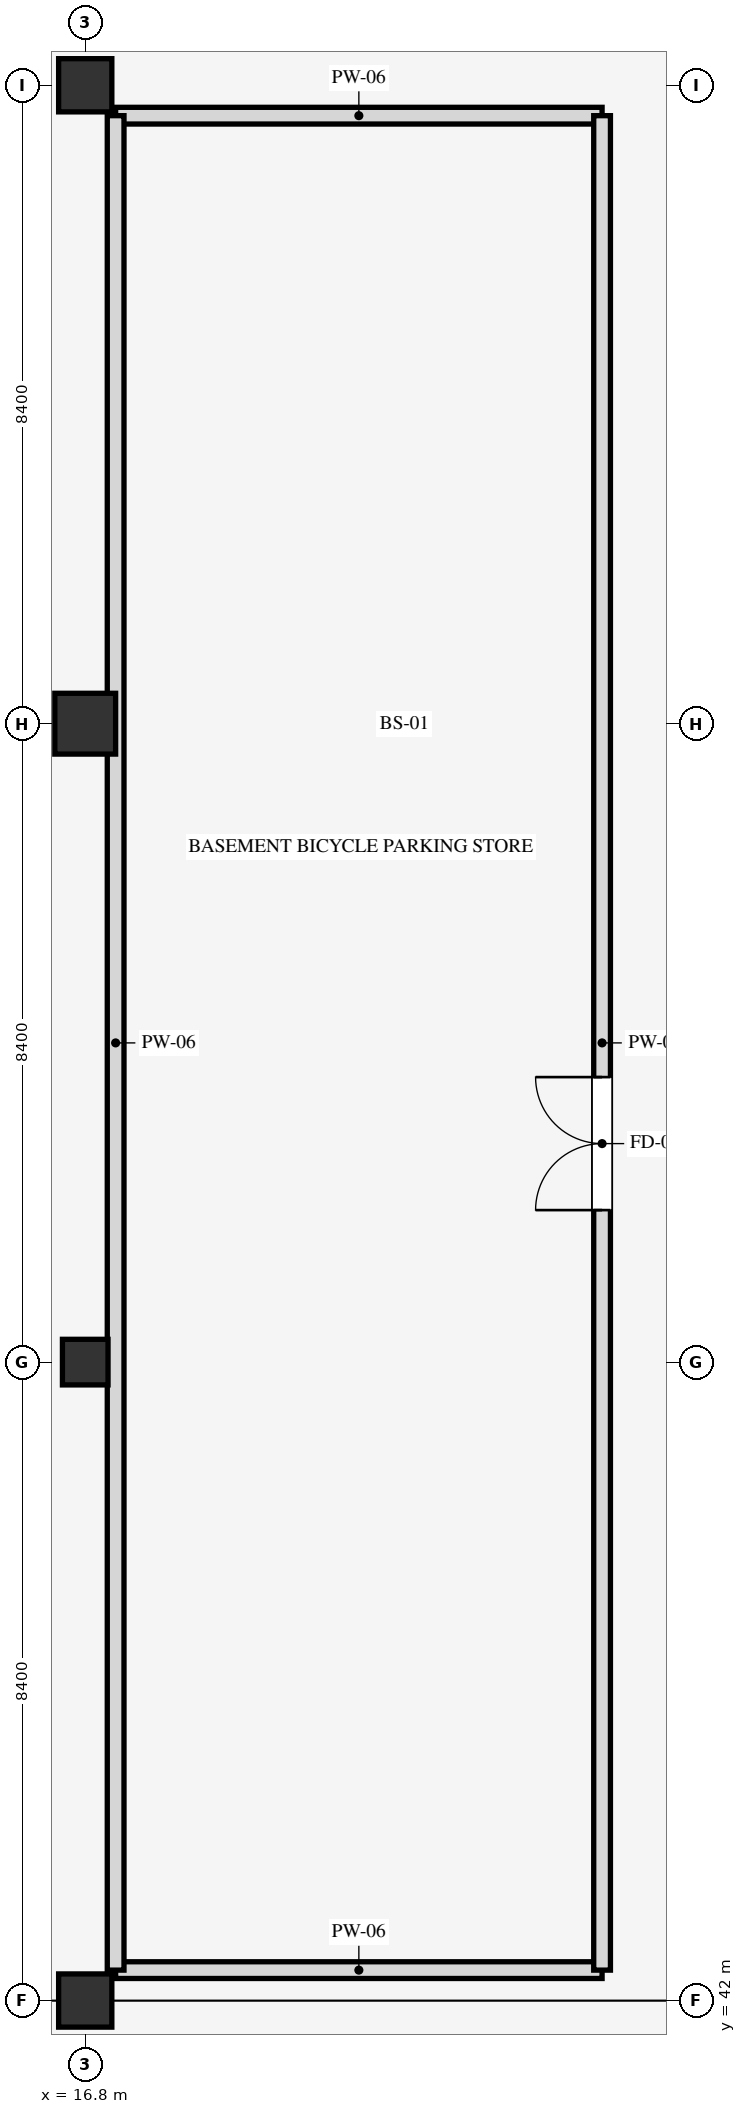
"""IFC4 building model, lengths in metres.
Left out: names, types, materials, properties, quantities, classifications, styles, units other than length and angle.
Written with IfcOpenShell. Run it as: python <this file> out.ifc"""

import sys

from ifc_helpers import new_model, si_unit, direction, frame, frame_2d, origin, origin_2d, place, context, subcontext, project, spatial, rectangle, extrude, element, fill, save


model = new_model("IFC4")
c1 = context("Model", 3, precision=1e-05, world=origin(), true_north=direction((0.0, 1.0)))
c2 = subcontext(c1, "Body", "Model", "MODEL_VIEW")
j1 = project(units=[si_unit("LENGTHUNIT", "METRE"), si_unit("PLANEANGLEUNIT", "RADIAN")], contexts=[c1])
p1 = place(None, origin())
s1 = spatial("IfcSite", under=j1, at=p1, CompositionType="ELEMENT")
p2 = place(p1, origin())
s2 = spatial("IfcBuilding", under=s1, at=p2, CompositionType="ELEMENT")
p3 = place(p2, frame((0.0, 0.0, -5.4)))
s3 = spatial("IfcBuildingStorey", under=s2, at=p3, CompositionType="ELEMENT", Elevation=-5.4)
p4 = place(p3, frame((16.8, 42.0, 0.0), z_axis=(0.0, 0.0, 1.0), x_axis=(1.0, 0.0, 0.0)))
e1 = element("IfcColumn", 1, at=p4, inside=s3, PredefinedType="COLUMN", context=c2, shape_type="SweptSolid", body=[
    extrude(rectangle(XDim=0.7, YDim=0.7, at=origin_2d()), origin(), (0.0, 0.0, 1.0), 5.4),
])
p5 = place(p3, frame((16.8, 50.4, 0.0), z_axis=(0.0, 0.0, 1.0), x_axis=(1.0, 0.0, 0.0)))
e2 = element("IfcColumn", 2, at=p5, inside=s3, PredefinedType="COLUMN", context=c2, shape_type="SweptSolid", body=[
    extrude(rectangle(XDim=0.6, YDim=0.6, at=origin_2d()), origin(), (0.0, 0.0, 1.0), 5.4),
])
p6 = place(p3, frame((16.8, 58.8, 0.0), z_axis=(0.0, 0.0, 1.0), x_axis=(1.0, 0.0, 0.0)))
e3 = element("IfcColumn", 3, at=p6, inside=s3, PredefinedType="COLUMN", context=c2, shape_type="SweptSolid", body=[
    extrude(rectangle(XDim=0.8, YDim=0.8, at=origin_2d()), origin(), (0.0, 0.0, 1.0), 5.4),
])
p7 = place(p3, frame((16.8, 67.2, 0.0), z_axis=(0.0, 0.0, 1.0), x_axis=(1.0, 0.0, 0.0)))
e4 = element("IfcColumn", 4, at=p7, inside=s3, PredefinedType="COLUMN", context=c2, shape_type="SweptSolid", body=[
    extrude(rectangle(XDim=0.7, YDim=0.7, at=origin_2d()), origin(), (0.0, 0.0, 1.0), 5.4),
])
for number, where, z_axis, x_axis in (
    (5, (17.2, 42.4, 0.0), (0.0, 0.0, 1.0), (1.0, 0.0, 0.0)),
    (6, (17.2, 66.8, 0.0), (0.0, 0.0, 1.0), (1.0, 0.0, 0.0)),
):
    element("IfcWall", number, at=place(p3, frame(where, z_axis=z_axis, x_axis=x_axis)), inside=s3, PredefinedType="PARTITIONING", context=c2, shape_type="SweptSolid", body=[
        extrude(rectangle(XDim=6.4, YDim=0.22, at=frame_2d((3.2, 0.0))), origin(), (0.0, 0.0, 1.0), 4.44),
    ])
p8 = place(p3, frame((17.2, 42.4, 0.0), z_axis=(0.0, 0.0, 1.0), x_axis=(0.0, 1.0, 0.0)))
e7 = element("IfcWall", 7, at=p8, inside=s3, PredefinedType="PARTITIONING", context=c2, shape_type="SweptSolid", body=[
    extrude(rectangle(XDim=24.4, YDim=0.22, at=frame_2d((12.2, 0.0))), origin(), (0.0, 0.0, 1.0), 4.44),
])
p9 = place(p3, frame((23.6, 42.4, 0.0), z_axis=(0.0, 0.0, 1.0), x_axis=(0.0, 1.0, 0.0)))
e8 = element("IfcWall", 8, at=p9, inside=s3, PredefinedType="PARTITIONING", context=c2, shape_type="SweptSolid", body=[
    extrude(rectangle(XDim=24.4, YDim=0.22, at=frame_2d((12.2, 0.0))), origin(), (0.0, 0.0, 1.0), 4.44),
])
p10 = place(p9, frame((10.0, 0.0, 0.0)))
e9 = element("IfcOpeningElement", 9, at=p10, cuts=e8, PredefinedType="OPENING", context=c2, shape_type="SweptSolid", body=[
    extrude(rectangle(XDim=1.75, YDim=2.2, at=frame_2d((0.875, 1.1))), frame((0.0, 0.12, 0.0), z_axis=(0.0, -1.0, 0.0), x_axis=(1.0, 0.0, 0.0)), (0.0, 0.0, 1.0), 0.24),
])
p11 = place(p10, origin())
e10 = element("IfcDoor", 10, at=p11, inside=s3, OperationType="DOUBLE_DOOR_SINGLE_SWING", PredefinedType="DOOR", context=c2, shape_type="SweptSolid", body=[
    extrude(rectangle(XDim=1.75, YDim=2.2, at=frame_2d((0.875, 1.1))), frame((0.0, 0.025, 0.0), z_axis=(0.0, -1.0, 0.0), x_axis=(1.0, 0.0, 0.0)), (0.0, 0.0, 1.0), 0.05),
])
fill(e9, e10)
save(model, sys.argv[1])
